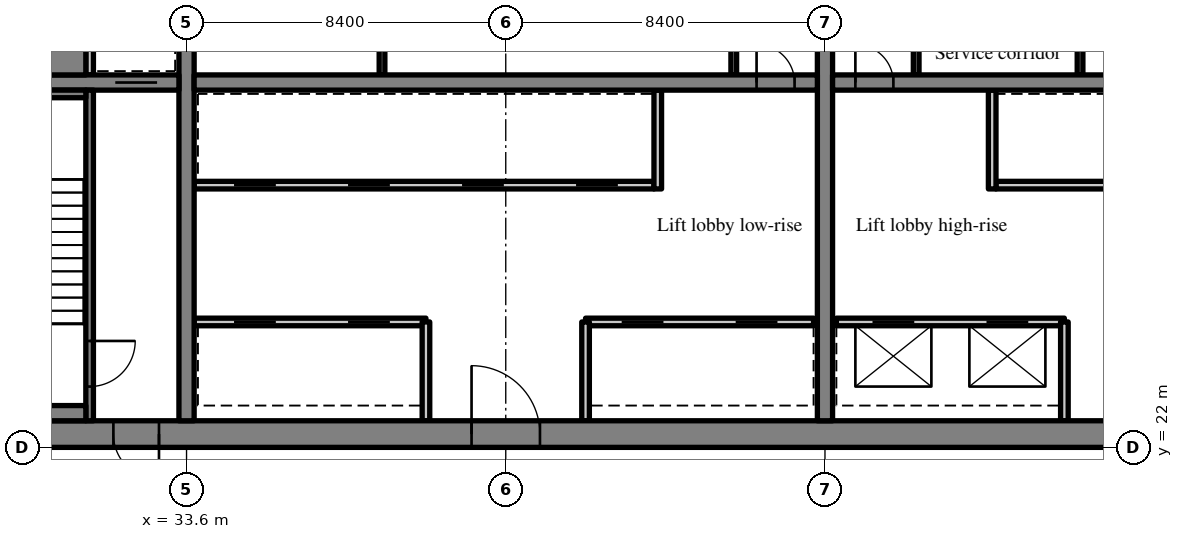
"""IFC4 building model, lengths in metres.
Left out: names, types, materials, properties, quantities, classifications, styles, units other than length and angle.
Written with IfcOpenShell. Run it as: python <this file> out.ifc"""

import sys

from ifc_helpers import new_model, si_unit, direction, frame, frame_2d, origin, place, context, subcontext, project, spatial, rectangle, extrude, source, transform, mapped, element, fill, save


model = new_model("IFC4")
c1 = context("Model", 3, precision=1e-05, world=origin(), true_north=direction((0.0, 1.0)))
c2 = subcontext(c1, "Body", "Model", "MODEL_VIEW")
j1 = project(units=[si_unit("LENGTHUNIT", "METRE"), si_unit("PLANEANGLEUNIT", "RADIAN")], contexts=[c1])
p1 = place(None, origin())
s1 = spatial("IfcSite", under=j1, at=p1, CompositionType="ELEMENT")
p2 = place(p1, origin())
s2 = spatial("IfcBuilding", under=s1, at=p2, CompositionType="ELEMENT")
p3 = place(p2, frame((0.0, 0.0, 146.2)))
s3 = spatial("IfcBuildingStorey", under=s2, at=p3, CompositionType="ELEMENT", Elevation=146.2)
m1 = source(origin(), c2, "Body", "SweptSolid", [
    extrude(rectangle(XDim=50.4, YDim=0.7, at=frame_2d((25.2, 0.0))), origin(), (0.0, 0.0, 1.0), 5.12),
])
p4 = place(p3, frame((25.2, 22.35, 0.0), z_axis=(0.0, 0.0, 1.0), x_axis=(1.0, 0.0, 0.0)))
e1 = element("IfcWall", 1, at=p4, inside=s3, PredefinedType="SHEAR", context=c2, shape_type="MappedRepresentation", body=[
    mapped(m1, transform((0.0, 0.0, 0.0), scale=1.0)),
])
m2 = source(origin(), c2, "Body", "SweptSolid", [
    extrude(rectangle(XDim=1.8, YDim=2.1, at=frame_2d((0.9, 1.05))), frame((0.0, 0.36, 0.0), z_axis=(0.0, -1.0, 0.0), x_axis=(1.0, 0.0, 0.0)), (0.0, 0.0, 1.0), 0.72),
])
p5 = place(p4, frame((15.9, 0.0, 0.0)))
e2 = element("IfcOpeningElement", 2, at=p5, cuts=e1, PredefinedType="OPENING", context=c2, shape_type="MappedRepresentation", body=[
    mapped(m2, transform((0.0, 0.0, 0.0), scale=1.0)),
])
p6 = place(p4, frame((32.7, 0.0, 0.0)))
e3 = element("IfcOpeningElement", 3, at=p6, cuts=e1, PredefinedType="OPENING", context=c2, shape_type="MappedRepresentation", body=[
    mapped(m2, transform((0.0, 0.0, 0.0), scale=1.0)),
])
m3 = source(origin(), c2, "Body", "SweptSolid", [
    extrude(rectangle(XDim=1.2, YDim=2.1, at=frame_2d((0.6, 1.05))), frame((0.0, 0.36, 0.0), z_axis=(0.0, -1.0, 0.0), x_axis=(1.0, 0.0, 0.0)), (0.0, 0.0, 1.0), 0.72),
])
p7 = place(p4, frame((6.475, 0.0, 0.0)))
e4 = element("IfcOpeningElement", 4, at=p7, cuts=e1, PredefinedType="OPENING", context=c2, shape_type="MappedRepresentation", body=[
    mapped(m3, transform((0.0, 0.0, 0.0), scale=1.0)),
])
p8 = place(p4, frame((47.875, 0.0, 0.0)))
e5 = element("IfcOpeningElement", 5, at=p8, cuts=e1, PredefinedType="OPENING", context=c2, shape_type="MappedRepresentation", body=[
    mapped(m3, transform((0.0, 0.0, 0.0), scale=1.0)),
])
m4 = source(origin(), c2, "Body", "SweptSolid", [
    extrude(rectangle(XDim=18.6, YDim=0.4, at=frame_2d((9.3, 0.0))), origin(), (0.0, 0.0, 1.0), 5.12),
])
p9 = place(p3, frame((33.6, 22.7, 0.0), z_axis=(0.0, 0.0, 1.0), x_axis=(0.0, 1.0, 0.0)))
e6 = element("IfcWall", 6, at=p9, inside=s3, PredefinedType="SHEAR", context=c2, shape_type="MappedRepresentation", body=[
    mapped(m4, transform((0.0, 0.0, 0.0), scale=1.0)),
])
m5 = source(origin(), c2, "Body", "SweptSolid", [
    extrude(rectangle(XDim=1.1, YDim=2.1, at=frame_2d((0.55, 1.05))), frame((0.0, 0.21, 0.0), z_axis=(0.0, -1.0, 0.0), x_axis=(1.0, 0.0, 0.0)), (0.0, 0.0, 1.0), 0.42),
])
p10 = place(p9, frame((12.75, 0.0, 0.0)))
e7 = element("IfcOpeningElement", 7, at=p10, cuts=e6, PredefinedType="OPENING", context=c2, shape_type="MappedRepresentation", body=[
    mapped(m5, transform((0.0, 0.0, 0.0), scale=1.0)),
])
p11 = place(p3, frame((50.4, 22.7, 0.0), z_axis=(0.0, 0.0, 1.0), x_axis=(0.0, 1.0, 0.0)))
e8 = element("IfcWall", 8, at=p11, inside=s3, PredefinedType="SHEAR", context=c2, shape_type="MappedRepresentation", body=[
    mapped(m4, transform((0.0, 0.0, 0.0), scale=1.0)),
])
p12 = place(p11, frame((12.75, 0.0, 0.0)))
e9 = element("IfcOpeningElement", 9, at=p12, cuts=e8, PredefinedType="OPENING", context=c2, shape_type="MappedRepresentation", body=[
    mapped(m5, transform((0.0, 0.0, 0.0), scale=1.0)),
])
m6 = source(origin(), c2, "Body", "SweptSolid", [
    extrude(rectangle(XDim=7.5, YDim=0.4, at=frame_2d((3.75, 0.0))), origin(), (0.0, 0.0, 1.0), 5.12),
])
p13 = place(p3, frame((25.9, 31.6, 0.0), z_axis=(0.0, 0.0, 1.0), x_axis=(1.0, 0.0, 0.0)))
e10 = element("IfcWall", 10, at=p13, inside=s3, PredefinedType="SHEAR", context=c2, shape_type="MappedRepresentation", body=[
    mapped(m6, transform((0.0, 0.0, 0.0), scale=1.0)),
])
p14 = place(p13, frame((5.825, 0.0, 0.0)))
e11 = element("IfcOpeningElement", 11, at=p14, cuts=e10, PredefinedType="OPENING", context=c2, shape_type="MappedRepresentation", body=[
    mapped(m5, transform((0.0, 0.0, 0.0), scale=1.0)),
])
m7 = source(origin(), c2, "Body", "SweptSolid", [
    extrude(rectangle(XDim=16.4, YDim=0.4, at=frame_2d((8.2, 0.0))), origin(), (0.0, 0.0, 1.0), 5.12),
])
p15 = place(p3, frame((33.8, 31.6, 0.0), z_axis=(0.0, 0.0, 1.0), x_axis=(1.0, 0.0, 0.0)))
e12 = element("IfcWall", 12, at=p15, inside=s3, PredefinedType="SHEAR", context=c2, shape_type="MappedRepresentation", body=[
    mapped(m7, transform((0.0, 0.0, 0.0), scale=1.0)),
])
m8 = source(origin(), c2, "Body", "SweptSolid", [
    extrude(rectangle(XDim=1.0, YDim=2.1, at=frame_2d((0.5, 1.05))), frame((0.0, 0.21, 0.0), z_axis=(0.0, -1.0, 0.0), x_axis=(1.0, 0.0, 0.0)), (0.0, 0.0, 1.0), 0.42),
])
p16 = place(p15, frame((14.8, 0.0, 0.0)))
e13 = element("IfcOpeningElement", 13, at=p16, cuts=e12, PredefinedType="OPENING", context=c2, shape_type="MappedRepresentation", body=[
    mapped(m8, transform((0.0, 0.0, 0.0), scale=1.0)),
])
p17 = place(p3, frame((50.6, 31.6, 0.0), z_axis=(0.0, 0.0, 1.0), x_axis=(1.0, 0.0, 0.0)))
e14 = element("IfcWall", 14, at=p17, inside=s3, PredefinedType="SHEAR", context=c2, shape_type="MappedRepresentation", body=[
    mapped(m7, transform((0.0, 0.0, 0.0), scale=1.0)),
])
p18 = place(p17, frame((0.6, 0.0, 0.0)))
e15 = element("IfcOpeningElement", 15, at=p18, cuts=e14, PredefinedType="OPENING", context=c2, shape_type="MappedRepresentation", body=[
    mapped(m8, transform((0.0, 0.0, 0.0), scale=1.0)),
])
m9 = source(origin(), c2, "Body", "SweptSolid", [
    extrude(rectangle(XDim=6.1, YDim=0.2, at=frame_2d((3.05, 0.0))), origin(), (0.0, 0.0, 1.0), 5.12),
])
p19 = place(p3, frame((33.8, 25.3, 0.0), z_axis=(0.0, 0.0, 1.0), x_axis=(1.0, 0.0, 0.0)))
e16 = element("IfcWall", 16, at=p19, inside=s3, PredefinedType="SOLIDWALL", context=c2, shape_type="MappedRepresentation", body=[
    mapped(m9, transform((0.0, 0.0, 0.0), scale=1.0)),
])
m10 = source(origin(), c2, "Body", "SweptSolid", [
    extrude(rectangle(XDim=1.1, YDim=2.1, at=frame_2d((0.55, 1.05))), frame((0.0, 0.11, 0.0), z_axis=(0.0, -1.0, 0.0), x_axis=(1.0, 0.0, 0.0)), (0.0, 0.0, 1.0), 0.22),
])
p20 = place(p19, frame((1.05, 0.0, 0.0)))
e17 = element("IfcOpeningElement", 17, at=p20, cuts=e16, PredefinedType="OPENING", context=c2, shape_type="MappedRepresentation", body=[
    mapped(m10, transform((0.0, 0.0, 0.0), scale=1.0)),
])
p21 = place(p19, frame((4.05, 0.0, 0.0)))
e18 = element("IfcOpeningElement", 18, at=p21, cuts=e16, PredefinedType="OPENING", context=c2, shape_type="MappedRepresentation", body=[
    mapped(m10, transform((0.0, 0.0, 0.0), scale=1.0)),
])
m11 = source(origin(), c2, "Body", "SweptSolid", [
    extrude(rectangle(XDim=6.0, YDim=0.2, at=frame_2d((3.0, 0.0))), origin(), (0.0, 0.0, 1.0), 5.12),
])
p22 = place(p3, frame((44.1, 25.3, 0.0), z_axis=(0.0, 0.0, 1.0), x_axis=(1.0, 0.0, 0.0)))
e19 = element("IfcWall", 19, at=p22, inside=s3, PredefinedType="SOLIDWALL", context=c2, shape_type="MappedRepresentation", body=[
    mapped(m11, transform((0.0, 0.0, 0.0), scale=1.0)),
])
p23 = place(p22, frame((0.95, 0.0, 0.0)))
e20 = element("IfcOpeningElement", 20, at=p23, cuts=e19, PredefinedType="OPENING", context=c2, shape_type="MappedRepresentation", body=[
    mapped(m10, transform((0.0, 0.0, 0.0), scale=1.0)),
])
p24 = place(p22, frame((3.95, 0.0, 0.0)))
e21 = element("IfcOpeningElement", 21, at=p24, cuts=e19, PredefinedType="OPENING", context=c2, shape_type="MappedRepresentation", body=[
    mapped(m10, transform((0.0, 0.0, 0.0), scale=1.0)),
])
m12 = source(origin(), c2, "Body", "SweptSolid", [
    extrude(rectangle(XDim=12.1, YDim=0.2, at=frame_2d((6.05, 0.0))), origin(), (0.0, 0.0, 1.0), 5.12),
])
p25 = place(p3, frame((33.8, 28.9, 0.0), z_axis=(0.0, 0.0, 1.0), x_axis=(1.0, 0.0, 0.0)))
e22 = element("IfcWall", 22, at=p25, inside=s3, PredefinedType="SOLIDWALL", context=c2, shape_type="MappedRepresentation", body=[
    mapped(m12, transform((0.0, 0.0, 0.0), scale=1.0)),
])
p26 = place(p25, frame((1.05, 0.0, 0.0)))
e23 = element("IfcOpeningElement", 23, at=p26, cuts=e22, PredefinedType="OPENING", context=c2, shape_type="MappedRepresentation", body=[
    mapped(m10, transform((0.0, 0.0, 0.0), scale=1.0)),
])
p27 = place(p25, frame((4.05, 0.0, 0.0)))
e24 = element("IfcOpeningElement", 24, at=p27, cuts=e22, PredefinedType="OPENING", context=c2, shape_type="MappedRepresentation", body=[
    mapped(m10, transform((0.0, 0.0, 0.0), scale=1.0)),
])
p28 = place(p25, frame((7.05, 0.0, 0.0)))
e25 = element("IfcOpeningElement", 25, at=p28, cuts=e22, PredefinedType="OPENING", context=c2, shape_type="MappedRepresentation", body=[
    mapped(m10, transform((0.0, 0.0, 0.0), scale=1.0)),
])
p29 = place(p25, frame((10.05, 0.0, 0.0)))
e26 = element("IfcOpeningElement", 26, at=p29, cuts=e22, PredefinedType="OPENING", context=c2, shape_type="MappedRepresentation", body=[
    mapped(m10, transform((0.0, 0.0, 0.0), scale=1.0)),
])
m13 = source(origin(), c2, "Body", "SweptSolid", [
    extrude(rectangle(XDim=2.6, YDim=0.2, at=frame_2d((1.3, 0.0))), origin(), (0.0, 0.0, 1.0), 5.12),
])
for number, where, z_axis, x_axis in (
    (27, (39.9, 22.7, 0.0), (0.0, 0.0, 1.0), (0.0, 1.0, 0.0)),
    (28, (44.1, 22.7, 0.0), (0.0, 0.0, 1.0), (0.0, 1.0, 0.0)),
):
    element("IfcWall", number, at=place(p3, frame(where, z_axis=z_axis, x_axis=x_axis)), inside=s3, PredefinedType="SOLIDWALL", context=c2, shape_type="MappedRepresentation", body=[
        mapped(m13, transform((0.0, 0.0, 0.0), scale=1.0)),
    ])
m14 = source(origin(), c2, "Body", "SweptSolid", [
    extrude(rectangle(XDim=2.6, YDim=0.2, at=frame_2d((1.3, 0.0))), origin(), (0.0, 0.0, 1.0), 5.12),
])
p30 = place(p3, frame((46.0, 28.8, 0.0), z_axis=(0.0, 0.0, 1.0), x_axis=(0.0, 1.0, 0.0)))
e29 = element("IfcWall", 29, at=p30, inside=s3, PredefinedType="SOLIDWALL", context=c2, shape_type="MappedRepresentation", body=[
    mapped(m14, transform((0.0, 0.0, 0.0), scale=1.0)),
])
m15 = source(origin(), c2, "Body", "SweptSolid", [
    extrude(rectangle(XDim=3.2, YDim=0.15, at=frame_2d((1.6, 0.0))), origin(), (0.0, 0.0, 1.0), 5.12),
])
for number, where, z_axis, x_axis in (
    (30, (48.0, 31.8, 0.0), (0.0, 0.0, 1.0), (0.0, 1.0, 0.0)),
    (31, (38.744, 31.8, 0.0), (0.0, 0.0, 1.0), (0.0, 1.0, 0.0)),
):
    element("IfcWall", number, at=place(p3, frame(where, z_axis=z_axis, x_axis=x_axis)), inside=s3, PredefinedType="PARTITIONING", context=c2, shape_type="MappedRepresentation", body=[
        mapped(m15, transform((0.0, 0.0, 0.0), scale=1.0)),
    ])
p31 = place(p3, frame((56.7, 25.3, 0.0), z_axis=(0.0, 0.0, 1.0), x_axis=(-1.0, 0.0, 0.0)))
e32 = element("IfcWall", 32, at=p31, inside=s3, PredefinedType="SOLIDWALL", context=c2, shape_type="MappedRepresentation", body=[
    mapped(m11, transform((0.0, 0.0, 0.0), scale=1.0)),
])
p32 = place(p31, frame((0.95, 0.0, 0.0)))
e33 = element("IfcOpeningElement", 33, at=p32, cuts=e32, PredefinedType="OPENING", context=c2, shape_type="MappedRepresentation", body=[
    mapped(m10, transform((0.0, 0.0, 0.0), scale=1.0)),
])
p33 = place(p31, frame((3.95, 0.0, 0.0)))
e34 = element("IfcOpeningElement", 34, at=p33, cuts=e32, PredefinedType="OPENING", context=c2, shape_type="MappedRepresentation", body=[
    mapped(m10, transform((0.0, 0.0, 0.0), scale=1.0)),
])
m16 = source(origin(), c2, "Body", "SweptSolid", [
    extrude(rectangle(XDim=12.1, YDim=0.2, at=frame_2d((6.05, 0.0))), origin(), (0.0, 0.0, 1.0), 5.12),
])
p34 = place(p3, frame((67.0, 28.9, 0.0), z_axis=(0.0, 0.0, 1.0), x_axis=(-1.0, 0.0, 0.0)))
e35 = element("IfcWall", 35, at=p34, inside=s3, PredefinedType="SOLIDWALL", context=c2, shape_type="MappedRepresentation", body=[
    mapped(m16, transform((0.0, 0.0, 0.0), scale=1.0)),
])
p35 = place(p34, frame((1.05, 0.0, 0.0)))
e36 = element("IfcOpeningElement", 36, at=p35, cuts=e35, PredefinedType="OPENING", context=c2, shape_type="MappedRepresentation", body=[
    mapped(m10, transform((0.0, 0.0, 0.0), scale=1.0)),
])
p36 = place(p34, frame((4.05, 0.0, 0.0)))
e37 = element("IfcOpeningElement", 37, at=p36, cuts=e35, PredefinedType="OPENING", context=c2, shape_type="MappedRepresentation", body=[
    mapped(m10, transform((0.0, 0.0, 0.0), scale=1.0)),
])
p37 = place(p3, frame((56.7, 22.7, 0.0), z_axis=(0.0, 0.0, 1.0), x_axis=(0.0, 1.0, 0.0)))
e38 = element("IfcWall", 38, at=p37, inside=s3, PredefinedType="SOLIDWALL", context=c2, shape_type="MappedRepresentation", body=[
    mapped(m13, transform((0.0, 0.0, 0.0), scale=1.0)),
])
p38 = place(p3, frame((54.8, 28.8, 0.0), z_axis=(0.0, 0.0, 1.0), x_axis=(0.0, 1.0, 0.0)))
e39 = element("IfcWall", 39, at=p38, inside=s3, PredefinedType="SOLIDWALL", context=c2, shape_type="MappedRepresentation", body=[
    mapped(m14, transform((0.0, 0.0, 0.0), scale=1.0)),
])
for number, where, z_axis, x_axis in (
    (40, (52.8, 31.8, 0.0), (0.0, 0.0, 1.0), (0.0, 1.0, 0.0)),
    (41, (57.112, 31.8, 0.0), (0.0, 0.0, 1.0), (0.0, 1.0, 0.0)),
):
    element("IfcWall", number, at=place(p3, frame(where, z_axis=z_axis, x_axis=x_axis)), inside=s3, PredefinedType="PARTITIONING", context=c2, shape_type="MappedRepresentation", body=[
        mapped(m15, transform((0.0, 0.0, 0.0), scale=1.0)),
    ])
m17 = source(origin(), c2, "Body", "SweptSolid", [
    extrude(rectangle(XDim=8.7, YDim=0.2, at=frame_2d((4.35, 0.0))), origin(), (0.0, 0.0, 1.0), 5.12),
])
p39 = place(p3, frame((31.05, 22.7, 0.0), z_axis=(0.0, 0.0, 1.0), x_axis=(0.0, 1.0, 0.0)))
e42 = element("IfcWall", 42, at=p39, inside=s3, PredefinedType="SOLIDWALL", context=c2, shape_type="MappedRepresentation", body=[
    mapped(m17, transform((0.0, 0.0, 0.0), scale=1.0)),
])
m18 = source(origin(), c2, "Body", "SweptSolid", [
    extrude(rectangle(XDim=1.2, YDim=2.1, at=frame_2d((0.6, 1.05))), frame((0.0, 0.11, 0.0), z_axis=(0.0, -1.0, 0.0), x_axis=(1.0, 0.0, 0.0)), (0.0, 0.0, 1.0), 0.22),
])
p40 = place(p39, frame((0.9, 0.0, 0.0)))
e43 = element("IfcOpeningElement", 43, at=p40, cuts=e42, PredefinedType="OPENING", context=c2, shape_type="MappedRepresentation", body=[
    mapped(m18, transform((0.0, 0.0, 0.0), scale=1.0)),
])
m19 = source(origin(), c2, "Body", "SweptSolid", [
    extrude(rectangle(XDim=1.8, YDim=0.2, at=frame_2d((0.9, 0.0))), origin(), (0.0, 0.0, 1.0), 5.12),
])
p41 = place(p3, frame((31.05, 31.8, 0.0), z_axis=(0.0, 0.0, 1.0), x_axis=(0.0, 1.0, 0.0)))
e44 = element("IfcWall", 44, at=p41, inside=s3, PredefinedType="SOLIDWALL", context=c2, shape_type="MappedRepresentation", body=[
    mapped(m19, transform((0.0, 0.0, 0.0), scale=1.0)),
])
m20 = source(origin(), c2, "Body", "SweptSolid", [
    extrude(rectangle(XDim=5.05, YDim=0.4, at=frame_2d((2.525, 0.0))), origin(), (0.0, 0.0, 1.0), 5.12),
])
p42 = place(p3, frame((25.9, 22.9, 0.0), z_axis=(0.0, 0.0, 1.0), x_axis=(1.0, 0.0, 0.0)))
e45 = element("IfcWall", 45, at=p42, inside=s3, PredefinedType="SOLIDWALL", context=c2, shape_type="MappedRepresentation", body=[
    mapped(m20, transform((0.0, 0.0, 0.0), scale=1.0)),
])
m21 = source(origin(), c2, "Body", "SweptSolid", [
    extrude(rectangle(XDim=5.05, YDim=0.2, at=frame_2d((2.525, 0.0))), origin(), (0.0, 0.0, 1.0), 5.12),
])
p43 = place(p3, frame((25.9, 31.3, 0.0), z_axis=(0.0, 0.0, 1.0), x_axis=(1.0, 0.0, 0.0)))
e46 = element("IfcWall", 46, at=p43, inside=s3, PredefinedType="SOLIDWALL", context=c2, shape_type="MappedRepresentation", body=[
    mapped(m21, transform((0.0, 0.0, 0.0), scale=1.0)),
])
m22 = source(origin(), c2, "Body", "SweptSolid", [
    extrude(rectangle(XDim=5.05, YDim=1.0, at=frame_2d((2.525, 0.0))), origin(), (0.0, 0.0, 1.0), 5.12),
])
p44 = place(p3, frame((25.9, 32.3, 0.0), z_axis=(0.0, 0.0, 1.0), x_axis=(1.0, 0.0, 0.0)))
e47 = element("IfcWall", 47, at=p44, inside=s3, PredefinedType="SOLIDWALL", context=c2, shape_type="MappedRepresentation", body=[
    mapped(m22, transform((0.0, 0.0, 0.0), scale=1.0)),
])
m23 = source(origin(), c2, "Body", "SweptSolid", [
    extrude(rectangle(XDim=1.8, YDim=2.1, at=frame_2d((0.9, 1.05))), frame((0.0, 0.275, 0.0), z_axis=(0.0, -1.0, 0.0), x_axis=(1.0, 0.0, 0.0)), (0.0, 0.0, 1.0), 0.05),
])
p45 = place(p5, origin())
e48 = element("IfcDoor", 48, at=p45, inside=s3, OperationType="DOUBLE_DOOR_SINGLE_SWING", PredefinedType="DOOR", context=c2, shape_type="MappedRepresentation", body=[
    mapped(m23, transform((0.0, 0.0, 0.0), scale=1.0)),
])
fill(e2, e48)
m24 = source(origin(), c2, "Body", "SweptSolid", [
    extrude(rectangle(XDim=1.0, YDim=2.1, at=frame_2d((0.5, 1.05))), frame((0.0, 0.025, 0.0), z_axis=(0.0, -1.0, 0.0), x_axis=(1.0, 0.0, 0.0)), (0.0, 0.0, 1.0), 0.05),
])
p46 = place(p16, origin())
e49 = element("IfcDoor", 49, at=p46, inside=s3, OperationType="SINGLE_SWING_LEFT", PredefinedType="DOOR", context=c2, shape_type="MappedRepresentation", body=[
    mapped(m24, transform((0.0, 0.0, 0.0), scale=1.0)),
])
fill(e13, e49)
m25 = source(origin(), c2, "Body", "SweptSolid", [
    extrude(rectangle(XDim=1.1, YDim=2.1, at=frame_2d((0.55, 1.05))), frame((0.0, 0.025, 0.0), z_axis=(0.0, -1.0, 0.0), x_axis=(1.0, 0.0, 0.0)), (0.0, 0.0, 1.0), 0.05),
])
p47 = place(p20, origin())
e50 = element("IfcDoor", 50, at=p47, inside=s3, OperationType="SLIDING_TO_LEFT", PredefinedType="DOOR", context=c2, shape_type="MappedRepresentation", body=[
    mapped(m25, transform((0.0, 0.0, 0.0), scale=1.0)),
])
fill(e17, e50)
p48 = place(p21, origin())
e51 = element("IfcDoor", 51, at=p48, inside=s3, OperationType="SLIDING_TO_RIGHT", PredefinedType="DOOR", context=c2, shape_type="MappedRepresentation", body=[
    mapped(m25, transform((0.0, 0.0, 0.0), scale=1.0)),
])
fill(e18, e51)
p49 = place(p23, origin())
e52 = element("IfcDoor", 52, at=p49, inside=s3, OperationType="SLIDING_TO_LEFT", PredefinedType="DOOR", context=c2, shape_type="MappedRepresentation", body=[
    mapped(m25, transform((0.0, 0.0, 0.0), scale=1.0)),
])
fill(e20, e52)
p50 = place(p24, origin())
e53 = element("IfcDoor", 53, at=p50, inside=s3, OperationType="SLIDING_TO_RIGHT", PredefinedType="DOOR", context=c2, shape_type="MappedRepresentation", body=[
    mapped(m25, transform((0.0, 0.0, 0.0), scale=1.0)),
])
fill(e21, e53)
p51 = place(p26, origin())
e54 = element("IfcDoor", 54, at=p51, inside=s3, OperationType="SLIDING_TO_LEFT", PredefinedType="DOOR", context=c2, shape_type="MappedRepresentation", body=[
    mapped(m25, transform((0.0, 0.0, 0.0), scale=1.0)),
])
fill(e23, e54)
p52 = place(p27, origin())
e55 = element("IfcDoor", 55, at=p52, inside=s3, OperationType="SLIDING_TO_RIGHT", PredefinedType="DOOR", context=c2, shape_type="MappedRepresentation", body=[
    mapped(m25, transform((0.0, 0.0, 0.0), scale=1.0)),
])
fill(e24, e55)
p53 = place(p28, origin())
e56 = element("IfcDoor", 56, at=p53, inside=s3, OperationType="SLIDING_TO_LEFT", PredefinedType="DOOR", context=c2, shape_type="MappedRepresentation", body=[
    mapped(m25, transform((0.0, 0.0, 0.0), scale=1.0)),
])
fill(e25, e56)
p54 = place(p29, origin())
e57 = element("IfcDoor", 57, at=p54, inside=s3, OperationType="SLIDING_TO_RIGHT", PredefinedType="DOOR", context=c2, shape_type="MappedRepresentation", body=[
    mapped(m25, transform((0.0, 0.0, 0.0), scale=1.0)),
])
fill(e26, e57)
p55 = place(p18, origin())
e58 = element("IfcDoor", 58, at=p55, inside=s3, OperationType="SINGLE_SWING_LEFT", PredefinedType="DOOR", context=c2, shape_type="MappedRepresentation", body=[
    mapped(m24, transform((0.0, 0.0, 0.0), scale=1.0)),
])
fill(e15, e58)
p56 = place(p32, origin())
e59 = element("IfcDoor", 59, at=p56, inside=s3, OperationType="SLIDING_TO_LEFT", PredefinedType="DOOR", context=c2, shape_type="MappedRepresentation", body=[
    mapped(m25, transform((0.0, 0.0, 0.0), scale=1.0)),
])
fill(e33, e59)
p57 = place(p33, origin())
e60 = element("IfcDoor", 60, at=p57, inside=s3, OperationType="SLIDING_TO_RIGHT", PredefinedType="DOOR", context=c2, shape_type="MappedRepresentation", body=[
    mapped(m25, transform((0.0, 0.0, 0.0), scale=1.0)),
])
fill(e34, e60)
m26 = source(origin(), c2, "Body", "SweptSolid", [
    extrude(rectangle(XDim=1.2, YDim=2.1, at=frame_2d((0.6, 1.05))), frame((0.0, 0.025, 0.0), z_axis=(0.0, -1.0, 0.0), x_axis=(1.0, 0.0, 0.0)), (0.0, 0.0, 1.0), 0.05),
])
p58 = place(p40, origin())
e61 = element("IfcDoor", 61, at=p58, inside=s3, OperationType="SINGLE_SWING_RIGHT", PredefinedType="DOOR", context=c2, shape_type="MappedRepresentation", body=[
    mapped(m26, transform((0.0, 0.0, 0.0), scale=1.0)),
])
fill(e43, e61)
m27 = source(origin(), c2, "Body", "SweptSolid", [
    extrude(rectangle(XDim=1.2, YDim=2.1, at=frame_2d((0.6, 1.05))), frame((0.0, 0.275, 0.0), z_axis=(0.0, -1.0, 0.0), x_axis=(1.0, 0.0, 0.0)), (0.0, 0.0, 1.0), 0.05),
])
p59 = place(p7, origin())
e62 = element("IfcDoor", 62, at=p59, inside=s3, OperationType="SINGLE_SWING_RIGHT", PredefinedType="DOOR", context=c2, shape_type="MappedRepresentation", body=[
    mapped(m27, transform((0.0, 0.0, 0.0), scale=1.0)),
])
fill(e4, e62)
p60 = place(p14, origin())
e63 = element("IfcDoor", 63, at=p60, inside=s3, OperationType="SLIDING_TO_RIGHT", PredefinedType="DOOR", context=c2, shape_type="MappedRepresentation", body=[
    mapped(m25, transform((0.0, 0.0, 0.0), scale=1.0)),
])
fill(e11, e63)
save(model, sys.argv[1])
